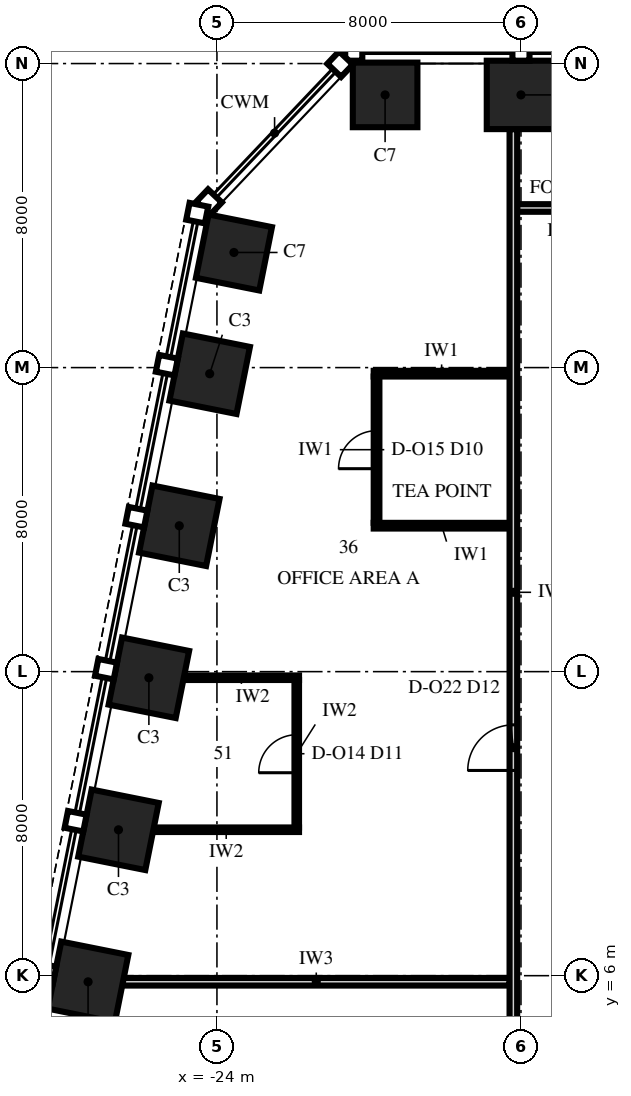
"""IFC4 building model, lengths in metres.
Left out: names, types, materials, properties, quantities, classifications, styles, units other than length and angle.
Written with IfcOpenShell. Run it as: python <this file> out.ifc"""

import sys

from ifc_helpers import new_model, si_unit, direction, frame, frame_2d, origin, origin_2d, place, context, subcontext, project, spatial, rectangle, extrude, element, fill, save


model = new_model("IFC4")
c1 = context("Model", 3, precision=1e-05, world=origin(), true_north=direction((0.0, 1.0)))
c2 = subcontext(c1, "Body", "Model", "MODEL_VIEW")
j1 = project(units=[si_unit("LENGTHUNIT", "METRE"), si_unit("PLANEANGLEUNIT", "RADIAN")], contexts=[c1])
p1 = place(None, origin())
s1 = spatial("IfcSite", under=j1, at=p1, CompositionType="ELEMENT")
p2 = place(p1, origin())
s2 = spatial("IfcBuilding", under=s1, at=p2, CompositionType="ELEMENT")
p3 = place(p2, frame((0.0, 0.0, 151.0)))
s3 = spatial("IfcBuildingStorey", under=s2, at=p3, CompositionType="ELEMENT", Elevation=151.0)
p4 = place(p3, frame((-16.0, 29.175, 0.0), z_axis=(0.0, 0.0, 1.0), x_axis=(-1.0, 0.0, 0.0)))
e1 = element("IfcColumn", 1, at=p4, inside=s3, PredefinedType="COLUMN", context=c2, shape_type="SweptSolid", body=[
    extrude(rectangle(XDim=1.8, YDim=1.8, at=origin_2d()), origin(), (0.0, 0.0, 1.0), 4.0),
])
for number, where, z_axis, x_axis in (
    (2, (-19.575, 29.175, 0.0), (0.0, 0.0, 1.0), (-1.0, 0.0, 0.0)),
    (3, (-23.553, 25.029, 0.0), (0.0, 0.0, 1.0), (-0.196, -0.981, 0.0)),
):
    element("IfcColumn", number, at=place(p3, frame(where, z_axis=z_axis, x_axis=x_axis)), inside=s3, PredefinedType="COLUMN", context=c2, shape_type="SweptSolid", body=[
        extrude(rectangle(XDim=1.7, YDim=1.7, at=origin_2d()), origin(), (0.0, 0.0, 1.0), 4.0),
    ])
for number, where, z_axis, x_axis in (
    (4, (-24.191, 21.838, 0.0), (0.0, 0.0, 1.0), (-0.196, -0.981, 0.0)),
    (5, (-24.991, 17.838, 0.0), (0.0, 0.0, 1.0), (-0.196, -0.981, 0.0)),
    (6, (-25.791, 13.838, 0.0), (0.0, 0.0, 1.0), (-0.196, -0.981, 0.0)),
    (7, (-26.591, 9.838, 0.0), (0.0, 0.0, 1.0), (-0.196, -0.981, 0.0)),
    (8, (-27.391, 5.838, 0.0), (0.0, 0.0, 1.0), (-0.196, -0.981, 0.0)),
):
    element("IfcColumn", number, at=place(p3, frame(where, z_axis=z_axis, x_axis=x_axis)), inside=s3, PredefinedType="COLUMN", context=c2, shape_type="SweptSolid", body=[
        extrude(rectangle(XDim=1.8, YDim=1.8, at=origin_2d()), origin(), (0.0, 0.0, 1.0), 4.0),
    ])
p5 = place(p3, frame((-26.473, 5.84, 0.0), z_axis=(0.0, 0.0, 1.0), x_axis=(1.0, 0.0, 0.0)))
e9 = element("IfcWall", 9, at=p5, inside=s3, PredefinedType="PARTITIONING", context=c2, shape_type="SweptSolid", body=[
    extrude(rectangle(XDim=10.173, YDim=0.2, at=frame_2d((5.086, 0.0))), origin(), (0.0, 0.0, 1.0), 2.842),
])
p6 = place(p3, frame((-25.673, 9.84, 0.0), z_axis=(0.0, 0.0, 1.0), x_axis=(1.0, 0.0, 0.0)))
e10 = element("IfcWall", 10, at=p6, inside=s3, PredefinedType="PARTITIONING", context=c2, shape_type="SweptSolid", body=[
    extrude(rectangle(XDim=3.833, YDim=0.12, at=frame_2d((1.917, 0.0))), origin(), (0.0, 0.0, 1.0), 3.25),
])
p7 = place(p3, frame((-24.873, 13.84, 0.0), z_axis=(0.0, 0.0, 1.0), x_axis=(1.0, 0.0, 0.0)))
e11 = element("IfcWall", 11, at=p7, inside=s3, PredefinedType="PARTITIONING", context=c2, shape_type="SweptSolid", body=[
    extrude(rectangle(XDim=3.033, YDim=0.12, at=frame_2d((1.516, 0.0))), origin(), (0.0, 0.0, 1.0), 3.25),
])
p8 = place(p3, frame((-19.875, 17.84, 0.0), z_axis=(0.0, 0.0, 1.0), x_axis=(1.0, 0.0, 0.0)))
e12 = element("IfcWall", 12, at=p8, inside=s3, PredefinedType="PARTITIONING", context=c2, shape_type="SweptSolid", body=[
    extrude(rectangle(XDim=3.575, YDim=0.15, at=frame_2d((1.788, 0.0))), origin(), (0.0, 0.0, 1.0), 3.25),
])
p9 = place(p3, frame((-19.875, 21.84, 0.0), z_axis=(0.0, 0.0, 1.0), x_axis=(1.0, 0.0, 0.0)))
e13 = element("IfcWall", 13, at=p9, inside=s3, PredefinedType="PARTITIONING", context=c2, shape_type="SweptSolid", body=[
    extrude(rectangle(XDim=3.575, YDim=0.15, at=frame_2d((1.788, 0.0))), origin(), (0.0, 0.0, 1.0), 3.4),
])
p10 = place(p3, frame((-16.1, 26.2, 0.0), z_axis=(0.0, 0.0, 1.0), x_axis=(1.0, 0.0, 0.0)))
e14 = element("IfcWall", 14, at=p10, inside=s3, PredefinedType="PARTITIONING", context=c2, shape_type="SweptSolid", body=[
    extrude(rectangle(XDim=32.2, YDim=0.2, at=frame_2d((16.1, 0.0))), origin(), (0.0, 0.0, 1.0), 3.4),
])
p11 = place(p10, frame((1.4, 0.0, 0.0)))
e15 = element("IfcOpeningElement", 15, at=p11, cuts=e14, PredefinedType="OPENING", context=c2, shape_type="SweptSolid", body=[
    extrude(rectangle(XDim=1.2, YDim=2.4, at=frame_2d((0.6, 1.2))), frame((0.0, 0.115, 0.0), z_axis=(0.0, -1.0, 0.0), x_axis=(1.0, 0.0, 0.0)), (0.0, 0.0, 1.0), 0.23),
])
p12 = place(p10, frame((5.5, 0.0, 0.0)))
e16 = element("IfcOpeningElement", 16, at=p12, cuts=e14, PredefinedType="OPENING", context=c2, shape_type="SweptSolid", body=[
    extrude(rectangle(XDim=1.2, YDim=2.4, at=frame_2d((0.6, 1.2))), frame((0.0, 0.115, 0.0), z_axis=(0.0, -1.0, 0.0), x_axis=(1.0, 0.0, 0.0)), (0.0, 0.0, 1.0), 0.23),
])
p13 = place(p10, frame((11.5, 0.0, 0.0)))
e17 = element("IfcOpeningElement", 17, at=p13, cuts=e14, PredefinedType="OPENING", context=c2, shape_type="SweptSolid", body=[
    extrude(rectangle(XDim=1.2, YDim=2.4, at=frame_2d((0.6, 1.2))), frame((0.0, 0.115, 0.0), z_axis=(0.0, -1.0, 0.0), x_axis=(1.0, 0.0, 0.0)), (0.0, 0.0, 1.0), 0.23),
])
p14 = place(p10, frame((17.5, 0.0, 0.0)))
e18 = element("IfcOpeningElement", 18, at=p14, cuts=e14, PredefinedType="OPENING", context=c2, shape_type="SweptSolid", body=[
    extrude(rectangle(XDim=1.2, YDim=2.4, at=frame_2d((0.6, 1.2))), frame((0.0, 0.115, 0.0), z_axis=(0.0, -1.0, 0.0), x_axis=(1.0, 0.0, 0.0)), (0.0, 0.0, 1.0), 0.23),
])
p15 = place(p10, frame((23.5, 0.0, 0.0)))
e19 = element("IfcOpeningElement", 19, at=p15, cuts=e14, PredefinedType="OPENING", context=c2, shape_type="SweptSolid", body=[
    extrude(rectangle(XDim=1.2, YDim=2.4, at=frame_2d((0.6, 1.2))), frame((0.0, 0.115, 0.0), z_axis=(0.0, -1.0, 0.0), x_axis=(1.0, 0.0, 0.0)), (0.0, 0.0, 1.0), 0.23),
])
p16 = place(p10, frame((29.6, 0.0, 0.0)))
e20 = element("IfcOpeningElement", 20, at=p16, cuts=e14, PredefinedType="OPENING", context=c2, shape_type="SweptSolid", body=[
    extrude(rectangle(XDim=1.2, YDim=2.4, at=frame_2d((0.6, 1.2))), frame((0.0, 0.115, 0.0), z_axis=(0.0, -1.0, 0.0), x_axis=(1.0, 0.0, 0.0)), (0.0, 0.0, 1.0), 0.23),
])
p17 = place(p3, frame((-21.9, 9.9, 0.0), z_axis=(0.0, 0.0, 1.0), x_axis=(0.0, 1.0, 0.0)))
e21 = element("IfcWall", 21, at=p17, inside=s3, PredefinedType="PARTITIONING", context=c2, shape_type="SweptSolid", body=[
    extrude(rectangle(XDim=3.88, YDim=0.12, at=frame_2d((1.94, 0.0))), origin(), (0.0, 0.0, 1.0), 3.85),
])
p18 = place(p17, frame((1.44, 0.0, 0.0)))
e22 = element("IfcOpeningElement", 22, at=p18, cuts=e21, PredefinedType="OPENING", context=c2, shape_type="SweptSolid", body=[
    extrude(rectangle(XDim=1.0, YDim=2.4, at=frame_2d((0.5, 1.2))), frame((0.0, 0.075, 0.0), z_axis=(0.0, -1.0, 0.0), x_axis=(1.0, 0.0, 0.0)), (0.0, 0.0, 1.0), 0.15),
])
p19 = place(p3, frame((-19.8, 17.915, 0.0), z_axis=(0.0, 0.0, 1.0), x_axis=(0.0, 1.0, 0.0)))
e23 = element("IfcWall", 23, at=p19, inside=s3, PredefinedType="PARTITIONING", context=c2, shape_type="SweptSolid", body=[
    extrude(rectangle(XDim=3.85, YDim=0.15, at=frame_2d((1.925, 0.0))), origin(), (0.0, 0.0, 1.0), 3.25),
])
p20 = place(p19, frame((1.425, 0.0, 0.0)))
e24 = element("IfcOpeningElement", 24, at=p20, cuts=e23, PredefinedType="OPENING", context=c2, shape_type="SweptSolid", body=[
    extrude(rectangle(XDim=1.0, YDim=2.3, at=frame_2d((0.5, 1.15))), frame((0.0, 0.09, 0.0), z_axis=(0.0, -1.0, 0.0), x_axis=(1.0, 0.0, 0.0)), (0.0, 0.0, 1.0), 0.18),
])
p21 = place(p3, frame((-16.2, 3.9, 0.0), z_axis=(0.0, 0.0, 1.0), x_axis=(0.0, 1.0, 0.0)))
e25 = element("IfcWall", 25, at=p21, inside=s3, PredefinedType="PARTITIONING", context=c2, shape_type="SweptSolid", body=[
    extrude(rectangle(XDim=24.375, YDim=0.2, at=frame_2d((12.188, 0.0))), origin(), (0.0, 0.0, 1.0), 2.842),
])
p22 = place(p21, frame((7.5, 0.0, 0.0)))
e26 = element("IfcOpeningElement", 26, at=p22, cuts=e25, PredefinedType="OPENING", context=c2, shape_type="SweptSolid", body=[
    extrude(rectangle(XDim=1.2, YDim=2.4, at=frame_2d((0.6, 1.2))), frame((0.0, 0.115, 0.0), z_axis=(0.0, -1.0, 0.0), x_axis=(1.0, 0.0, 0.0)), (0.0, 0.0, 1.0), 0.23),
])
p23 = place(p18, origin())
e27 = element("IfcDoor", 27, at=p23, inside=s3, OperationType="SINGLE_SWING_RIGHT", PredefinedType="DOOR", context=c2, shape_type="SweptSolid", body=[
    extrude(rectangle(XDim=1.0, YDim=2.4, at=frame_2d((0.5, 1.2))), frame((0.0, 0.06, 0.0), z_axis=(0.0, -1.0, 0.0), x_axis=(1.0, 0.0, 0.0)), (0.0, 0.0, 1.0), 0.12),
])
fill(e22, e27)
p24 = place(p20, origin())
e28 = element("IfcDoor", 28, at=p24, inside=s3, OperationType="SINGLE_SWING_LEFT", PredefinedType="DOOR", context=c2, shape_type="SweptSolid", body=[
    extrude(rectangle(XDim=1.0, YDim=2.3, at=frame_2d((0.5, 1.15))), frame((0.0, 0.075, 0.0), z_axis=(0.0, -1.0, 0.0), x_axis=(1.0, 0.0, 0.0)), (0.0, 0.0, 1.0), 0.149),
])
fill(e24, e28)
p25 = place(p22, origin())
e29 = element("IfcDoor", 29, at=p25, inside=s3, OperationType="SINGLE_SWING_LEFT", PredefinedType="DOOR", context=c2, shape_type="SweptSolid", body=[
    extrude(rectangle(XDim=1.2, YDim=2.4, at=frame_2d((0.6, 1.2))), frame((0.0, 0.1, 0.0), z_axis=(0.0, -1.0, 0.0), x_axis=(1.0, 0.0, 0.0)), (0.0, 0.0, 1.0), 0.199),
])
fill(e26, e29)
save(model, sys.argv[1])
